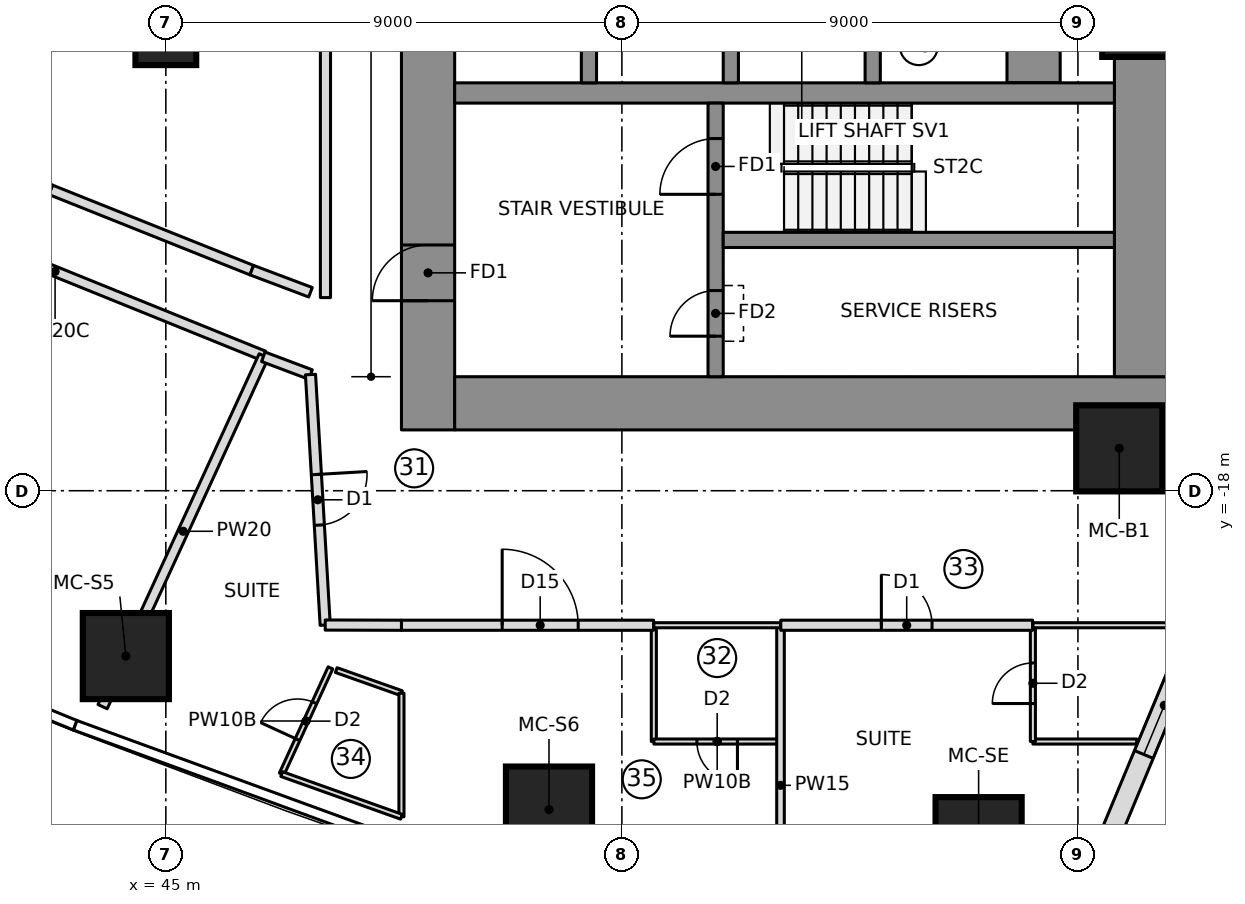
"""IFC4 building model, lengths in metres.
Left out: names, types, materials, properties, quantities, classifications, styles, units other than length and angle.
Written with IfcOpenShell. Run it as: python <this file> out.ifc"""

import sys

from ifc_helpers import new_model, si_unit, direction, frame, frame_2d, origin, origin_2d, place, context, subcontext, project, spatial, polyline, rectangle, outline, extrude, element, fill, save


model = new_model("IFC4")
c1 = context("Model", 3, precision=1e-05, world=origin(), true_north=direction((0.0, 1.0)))
c2 = subcontext(c1, "Body", "Model", "MODEL_VIEW")
j1 = project(units=[si_unit("LENGTHUNIT", "METRE"), si_unit("PLANEANGLEUNIT", "RADIAN")], contexts=[c1])
p1 = place(None, origin())
s1 = spatial("IfcSite", under=j1, at=p1, CompositionType="ELEMENT")
p2 = place(p1, origin())
s2 = spatial("IfcBuilding", under=s1, at=p2, CompositionType="ELEMENT")
p3 = place(p2, frame((0.0, 0.0, 95.55)))
s3 = spatial("IfcBuildingStorey", under=s2, at=p3, CompositionType="ELEMENT", Elevation=95.55)
p4 = place(p3, frame((50.175, -16.8, 0.0), z_axis=(0.0, 0.0, 1.0), x_axis=(0.0, 1.0, 0.0)))
e1 = element("IfcWall", 1, at=p4, inside=s3, PredefinedType="SHEAR", context=c2, shape_type="SweptSolid", body=[
    extrude(rectangle(XDim=10.15, YDim=1.05, at=frame_2d((5.075, 0.0))), origin(), (0.0, 0.0, 1.0), 3.55),
])
p5 = place(p4, frame((2.55, 0.0, 0.0)))
e2 = element("IfcOpeningElement", 2, at=p5, cuts=e1, PredefinedType="OPENING", context=c2, shape_type="SweptSolid", body=[
    extrude(rectangle(XDim=1.1, YDim=2.1, at=frame_2d((0.55, 1.05))), frame((0.0, 0.535, 0.0), z_axis=(0.0, -1.0, 0.0), x_axis=(1.0, 0.0, 0.0)), (0.0, 0.0, 1.0), 1.07),
])
p6 = place(p3, frame((50.7, -16.275, 0.0), z_axis=(0.0, 0.0, 1.0), x_axis=(1.0, 0.0, 0.0)))
e3 = element("IfcWall", 3, at=p6, inside=s3, PredefinedType="SHEAR", context=c2, shape_type="SweptSolid", body=[
    extrude(rectangle(XDim=14.07, YDim=1.05, at=frame_2d((7.035, 0.0))), origin(), (0.0, 0.0, 1.0), 3.55),
])
p7 = place(p3, frame((64.245, -15.75, 0.0), z_axis=(0.0, 0.0, 1.0), x_axis=(0.0, 1.0, 0.0)))
e4 = element("IfcWall", 4, at=p7, inside=s3, PredefinedType="SHEAR", context=c2, shape_type="SweptSolid", body=[
    extrude(rectangle(XDim=6.361, YDim=1.05, at=frame_2d((3.181, 0.0))), origin(), (0.0, 0.0, 1.0), 3.55),
])
p8 = place(p3, frame((62.125, -9.95, 0.0), z_axis=(0.0, 0.0, 1.0), x_axis=(0.0, 1.0, 0.0)))
e5 = element("IfcWall", 5, at=p8, inside=s3, PredefinedType="SHEAR", context=c2, shape_type="SweptSolid", body=[
    extrude(rectangle(XDim=19.9, YDim=1.05, at=frame_2d((9.95, 0.0))), origin(), (0.0, 0.0, 1.0), 3.55),
])
p9 = place(p3, frame((50.7, -10.15, 0.0), z_axis=(0.0, 0.0, 1.0), x_axis=(1.0, 0.0, 0.0)))
e6 = element("IfcWall", 6, at=p9, inside=s3, PredefinedType="SHEAR", context=c2, shape_type="SweptSolid", body=[
    extrude(rectangle(XDim=13.02, YDim=0.4, at=frame_2d((6.51, 0.0))), origin(), (0.0, 0.0, 1.0), 3.55),
])
for number, where, z_axis, x_axis in (
    (7, (53.35, -9.95, 0.0), (0.0, 0.0, 1.0), (0.0, 1.0, 0.0)),
    (8, (56.15, -9.95, 0.0), (0.0, 0.0, 1.0), (0.0, 1.0, 0.0)),
    (9, (58.95, -9.95, 0.0), (0.0, 0.0, 1.0), (0.0, 1.0, 0.0)),
):
    element("IfcWall", number, at=place(p3, frame(where, z_axis=z_axis, x_axis=x_axis)), inside=s3, PredefinedType="SHEAR", context=c2, shape_type="SweptSolid", body=[
        extrude(rectangle(XDim=3.0, YDim=0.3, at=frame_2d((1.5, 0.0))), origin(), (0.0, 0.0, 1.0), 3.55),
    ])
p10 = place(p3, frame((55.85, -15.75, 0.0), z_axis=(0.0, 0.0, 1.0), x_axis=(0.0, 1.0, 0.0)))
e10 = element("IfcWall", 10, at=p10, inside=s3, PredefinedType="SHEAR", context=c2, shape_type="SweptSolid", body=[
    extrude(rectangle(XDim=5.4, YDim=0.3, at=frame_2d((2.7, 0.0))), origin(), (0.0, 0.0, 1.0), 3.55),
])
p11 = place(p10, frame((3.6, 0.0, 0.0)))
e11 = element("IfcOpeningElement", 11, at=p11, cuts=e10, PredefinedType="OPENING", context=c2, shape_type="SweptSolid", body=[
    extrude(rectangle(XDim=1.1, YDim=2.1, at=frame_2d((0.55, 1.05))), frame((0.0, 0.16, 0.0), z_axis=(0.0, -1.0, 0.0), x_axis=(1.0, 0.0, 0.0)), (0.0, 0.0, 1.0), 0.32),
])
p12 = place(p10, frame((0.8, 0.0, 0.0)))
e12 = element("IfcOpeningElement", 12, at=p12, cuts=e10, PredefinedType="OPENING", context=c2, shape_type="SweptSolid", body=[
    extrude(rectangle(XDim=0.9, YDim=2.1, at=frame_2d((0.45, 1.05))), frame((0.0, 0.16, 0.0), z_axis=(0.0, -1.0, 0.0), x_axis=(1.0, 0.0, 0.0)), (0.0, 0.0, 1.0), 0.32),
])
p13 = place(p3, frame((56.0, -13.05, 0.0), z_axis=(0.0, 0.0, 1.0), x_axis=(1.0, 0.0, 0.0)))
e13 = element("IfcWall", 13, at=p13, inside=s3, PredefinedType="SHEAR", context=c2, shape_type="SweptSolid", body=[
    extrude(rectangle(XDim=7.72, YDim=0.3, at=frame_2d((3.86, 0.0))), origin(), (0.0, 0.0, 1.0), 3.55),
])
for number, where, z_axis, x_axis in (
    (14, (44.211, -21.264, 0.0), (0.0, 0.0, 1.0), (1.0, 0.0, 0.0)),
    (15, (52.562, -24.293, 0.0), (0.0, 0.0, 1.0), (1.0, 0.0, 0.0)),
    (16, (61.04, -24.897, 0.0), (0.0, 0.0, 1.0), (1.0, 0.0, 0.0)),
    (17, (63.816, -17.164, 0.0), (0.0, 0.0, 1.0), (1.0, 0.0, 0.0)),
    (18, (64.329, -8.589, 0.0), (0.0, 0.0, 1.0), (1.0, 0.0, 0.0)),
):
    element("IfcColumn", number, at=place(p3, frame(where, z_axis=z_axis, x_axis=x_axis)), inside=s3, PredefinedType="COLUMN", context=c2, shape_type="SweptSolid", body=[
        extrude(rectangle(XDim=1.7, YDim=1.7, at=origin_2d()), origin(), (0.0, 0.0, 1.0), 3.55),
    ])
p14 = place(p3, frame((45.0, -9.0, 0.0), z_axis=(0.0, 0.0, 1.0), x_axis=(1.0, 0.0, 0.0)))
e19 = element("IfcColumn", 19, at=p14, inside=s3, PredefinedType="COLUMN", context=c2, shape_type="SweptSolid", body=[
    extrude(rectangle(XDim=1.2, YDim=1.2, at=origin_2d()), origin(), (0.0, 0.0, 1.0), 3.55),
])
p15 = place(p3, frame((63.59, -24.916, 0.0), z_axis=(0.0, 0.0, 1.0), x_axis=(0.383997751971, 0.923334027577, 0.0)))
e20 = element("IfcWall", 20, at=p15, inside=s3, PredefinedType="NOTDEFINED", context=c2, shape_type="SweptSolid", body=[
    extrude(outline(polyline([(-0.061, -0.2), (4.27, -0.2), (4.208, 0.2), (0.061, 0.2), (-0.061, -0.2)])), origin(), (0.0, 0.0, 1.0), 3.25),
])
p16 = place(p15, frame((1.852, 0.0, 0.6)))
e21 = element("IfcOpeningElement", 21, at=p16, cuts=e20, PredefinedType="OPENING", context=c2, shape_type="SweptSolid", body=[
    extrude(outline(polyline([(0.0, 1.4), (0.08, 1.802), (0.308, 2.142), (0.648, 2.37), (1.05, 2.45), (1.452, 2.37), (1.792, 2.142), (2.02, 1.802), (2.1, 1.4), (2.1, 1.05), (2.02, 0.648), (1.792, 0.308), (1.452, 0.08), (1.05, 0.0), (0.648, 0.08), (0.308, 0.308), (0.08, 0.648), (0.0, 1.05), (0.0, 1.4)])), frame((0.0, 0.21, 0.0), z_axis=(0.0, -1.0, 0.0), x_axis=(1.0, 0.0, 0.0)), (0.0, 0.0, 1.0), 0.42),
])
p17 = place(p3, frame((54.631, -22.95, 0.0), z_axis=(0.0, 0.0, 1.0), x_axis=(0.0, 1.0, 0.0)))
e22 = element("IfcWall", 22, at=p17, inside=s3, PredefinedType="PARTITIONING", context=c2, shape_type="SweptSolid", body=[
    extrude(rectangle(XDim=2.3, YDim=0.1, at=frame_2d((1.15, 0.0))), origin(), (0.0, 0.0, 1.0), 3.25),
])
p18 = place(p3, frame((57.131, -22.95, 0.0), z_axis=(0.0, 0.0, 1.0), x_axis=(-1.0, 0.0, 0.0)))
e23 = element("IfcWall", 23, at=p18, inside=s3, PredefinedType="PARTITIONING", context=c2, shape_type="SweptSolid", body=[
    extrude(rectangle(XDim=2.5, YDim=0.1, at=frame_2d((1.25, 0.0))), origin(), (0.0, 0.0, 1.0), 3.25),
])
p19 = place(p18, frame((0.85, 0.0, 0.0)))
e24 = element("IfcOpeningElement", 24, at=p19, cuts=e23, PredefinedType="OPENING", context=c2, shape_type="SweptSolid", body=[
    extrude(rectangle(XDim=0.8, YDim=2.1, at=frame_2d((0.4, 1.05))), frame((0.0, 0.06, 0.0), z_axis=(0.0, -1.0, 0.0), x_axis=(1.0, 0.0, 0.0)), (0.0, 0.0, 1.0), 0.12),
])
p20 = place(p3, frame((64.16, -22.95, 0.0), z_axis=(0.0, 0.0, 1.0), x_axis=(-1.0, 0.0, 0.0)))
e25 = element("IfcWall", 25, at=p20, inside=s3, PredefinedType="PARTITIONING", context=c2, shape_type="SweptSolid", body=[
    extrude(rectangle(XDim=2.049, YDim=0.1, at=frame_2d((1.025, 0.0))), origin(), (0.0, 0.0, 1.0), 3.25),
])
p21 = place(p3, frame((62.111, -22.95, 0.0), z_axis=(0.0, 0.0, 1.0), x_axis=(0.0, 1.0, 0.0)))
e26 = element("IfcWall", 26, at=p21, inside=s3, PredefinedType="PARTITIONING", context=c2, shape_type="SweptSolid", body=[
    extrude(rectangle(XDim=2.3, YDim=0.1, at=frame_2d((1.15, 0.0))), origin(), (0.0, 0.0, 1.0), 3.25),
])
p22 = place(p21, frame((0.75, 0.0, 0.0)))
e27 = element("IfcOpeningElement", 27, at=p22, cuts=e26, PredefinedType="OPENING", context=c2, shape_type="SweptSolid", body=[
    extrude(rectangle(XDim=0.8, YDim=2.1, at=frame_2d((0.4, 1.05))), frame((0.0, 0.06, 0.0), z_axis=(0.0, -1.0, 0.0), x_axis=(1.0, 0.0, 0.0)), (0.0, 0.0, 1.0), 0.12),
])
p23 = place(p3, frame((57.131, -26.979, 0.0), z_axis=(0.0, 0.0, 1.0), x_axis=(0.0, 1.0, 0.0)))
e28 = element("IfcWall", 28, at=p23, inside=s3, PredefinedType="PARTITIONING", context=c2, shape_type="SweptSolid", body=[
    extrude(rectangle(XDim=6.329, YDim=0.15, at=frame_2d((3.165, 0.0))), origin(), (0.0, 0.0, 1.0), 3.25),
])
p24 = place(p3, frame((38.696, -12.007, 0.0), z_axis=(0.0, 0.0, 1.0), x_axis=(0.927027566285, -0.374993188401, 0.0)))
e29 = element("IfcWall", 29, at=p24, inside=s3, PredefinedType="PARTITIONING", context=c2, shape_type="SweptSolid", body=[
    extrude(rectangle(XDim=8.885, YDim=0.2, at=frame_2d((4.442, 0.0))), origin(), (0.0, 0.0, 1.0), 3.25),
])
p25 = place(p24, frame((3.05, 0.0, 0.0)))
e30 = element("IfcOpeningElement", 30, at=p25, cuts=e29, PredefinedType="OPENING", context=c2, shape_type="SweptSolid", body=[
    extrude(rectangle(XDim=1.0, YDim=2.1, at=frame_2d((0.5, 1.05))), frame((0.0, 0.11, 0.0), z_axis=(0.0, -1.0, 0.0), x_axis=(1.0, 0.0, 0.0)), (0.0, 0.0, 1.0), 0.22),
])
p26 = place(p3, frame((43.752, -22.262, 0.0), z_axis=(0.0, 0.0, 1.0), x_axis=(0.417437957167, 0.908705426371, 0.0)))
e31 = element("IfcWall", 31, at=p26, inside=s3, PredefinedType="PARTITIONING", context=c2, shape_type="SweptSolid", body=[
    extrude(rectangle(XDim=7.619, YDim=0.2, at=frame_2d((3.81, 0.0))), origin(), (0.0, 0.0, 1.0), 3.25),
])
p27 = place(p3, frame((48.363, -21.54, 0.0), z_axis=(0.0, 0.0, 1.0), x_axis=(0.942692856107, -0.333661773425, 0.0)))
e32 = element("IfcWall", 32, at=p27, inside=s3, PredefinedType="PARTITIONING", context=c2, shape_type="SweptSolid", body=[
    extrude(rectangle(XDim=1.365, YDim=0.1, at=frame_2d((0.683, 0.0))), origin(), (0.0, 0.0, 1.0), 3.25),
])
p28 = place(p3, frame((47.286, -23.592, 0.0), z_axis=(0.0, 0.0, 1.0), x_axis=(0.41749308293, 0.908680100864, 0.0)))
e33 = element("IfcWall", 33, at=p28, inside=s3, PredefinedType="PARTITIONING", context=c2, shape_type="SweptSolid", body=[
    extrude(rectangle(XDim=2.306, YDim=0.1, at=frame_2d((1.153, 0.0))), origin(), (0.0, 0.0, 1.0), 3.25),
])
p29 = place(p28, frame((0.75, 0.0, 0.0)))
e34 = element("IfcOpeningElement", 34, at=p29, cuts=e33, PredefinedType="OPENING", context=c2, shape_type="SweptSolid", body=[
    extrude(rectangle(XDim=0.8, YDim=2.1, at=frame_2d((0.4, 1.05))), frame((0.0, 0.06, 0.0), z_axis=(0.0, -1.0, 0.0), x_axis=(1.0, 0.0, 0.0)), (0.0, 0.0, 1.0), 0.12),
])
p30 = place(p3, frame((46.696, -13.647, 0.0), z_axis=(0.0, 0.0, 1.0), x_axis=(-0.928638161177, 0.370986745864, 0.0)))
e35 = element("IfcWall", 35, at=p30, inside=s3, PredefinedType="PARTITIONING", context=c2, shape_type="SweptSolid", body=[
    extrude(rectangle(XDim=4.273, YDim=0.2, at=frame_2d((2.136, 0.0))), origin(), (0.0, 0.0, 1.0), 3.25),
])
p31 = place(p3, frame((42.728, -12.062, 0.0), z_axis=(0.0, 0.0, 1.0), x_axis=(-0.921037415532, 0.389474105929, 0.0)))
e36 = element("IfcWall", 36, at=p31, inside=s3, PredefinedType="PARTITIONING", context=c2, shape_type="SweptSolid", body=[
    extrude(rectangle(XDim=4.273, YDim=0.2, at=frame_2d((2.137, 0.0))), origin(), (0.0, 0.0, 1.0), 3.25),
])
p32 = place(p3, frame((49.65, -20.655, 0.0), z_axis=(0.0, 0.0, 1.0), x_axis=(1.0, 0.0, 0.0)))
e37 = element("IfcWall", 37, at=p32, inside=s3, PredefinedType="PARTITIONING", context=c2, shape_type="SweptSolid", body=[
    extrude(rectangle(XDim=4.976, YDim=0.2, at=frame_2d((2.488, 0.0))), origin(), (0.0, 0.0, 1.0), 3.25),
])
p33 = place(p32, frame((1.988, 0.0, 0.0)))
e38 = element("IfcOpeningElement", 38, at=p33, cuts=e37, PredefinedType="OPENING", context=c2, shape_type="SweptSolid", body=[
    extrude(rectangle(XDim=1.5, YDim=2.1, at=frame_2d((0.75, 1.05))), frame((0.0, 0.11, 0.0), z_axis=(0.0, -1.0, 0.0), x_axis=(1.0, 0.0, 0.0)), (0.0, 0.0, 1.0), 0.22),
])
p34 = place(p3, frame((57.135, -20.655, 0.0), z_axis=(0.0, 0.0, 1.0), x_axis=(1.0, 0.0, 0.0)))
e39 = element("IfcWall", 39, at=p34, inside=s3, PredefinedType="PARTITIONING", context=c2, shape_type="SweptSolid", body=[
    extrude(rectangle(XDim=4.971, YDim=0.2, at=frame_2d((2.485, 0.0))), origin(), (0.0, 0.0, 1.0), 3.25),
])
p35 = place(p34, frame((1.985, 0.0, 0.0)))
e40 = element("IfcOpeningElement", 40, at=p35, cuts=e39, PredefinedType="OPENING", context=c2, shape_type="SweptSolid", body=[
    extrude(rectangle(XDim=1.0, YDim=2.1, at=frame_2d((0.5, 1.05))), frame((0.0, 0.11, 0.0), z_axis=(0.0, -1.0, 0.0), x_axis=(1.0, 0.0, 0.0)), (0.0, 0.0, 1.0), 0.22),
])
p36 = place(p3, frame((54.631, -20.655, 0.0), z_axis=(0.0, 0.0, 1.0), x_axis=(1.0, 0.0, 0.0)))
e41 = element("IfcWall", 41, at=p36, inside=s3, PredefinedType="PARTITIONING", context=c2, shape_type="SweptSolid", body=[
    extrude(rectangle(XDim=2.5, YDim=0.1, at=frame_2d((1.25, 0.0))), origin(), (0.0, 0.0, 1.0), 3.25),
])
p37 = place(p3, frame((62.111, -20.655, 0.0), z_axis=(0.0, 0.0, 1.0), x_axis=(1.0, 0.0, 0.0)))
e42 = element("IfcWall", 42, at=p37, inside=s3, PredefinedType="PARTITIONING", context=c2, shape_type="SweptSolid", body=[
    extrude(rectangle(XDim=2.906, YDim=0.1, at=frame_2d((1.453, 0.0))), origin(), (0.0, 0.0, 1.0), 3.25),
])
p38 = place(p3, frame((49.65, -21.996, 0.0), z_axis=(0.0, 0.0, 1.0), x_axis=(0.0, -1.0, 0.0)))
e43 = element("IfcWall", 43, at=p38, inside=s3, PredefinedType="PARTITIONING", context=c2, shape_type="SweptSolid", body=[
    extrude(rectangle(XDim=2.439, YDim=0.1, at=frame_2d((1.22, 0.0))), origin(), (0.0, 0.0, 1.0), 3.25),
])
p39 = place(p3, frame((49.65, -24.435, 0.0), z_axis=(0.0, 0.0, 1.0), x_axis=(-0.941933231826, 0.335800218555, 0.0)))
e44 = element("IfcWall", 44, at=p39, inside=s3, PredefinedType="PARTITIONING", context=c2, shape_type="SweptSolid", body=[
    extrude(rectangle(XDim=2.51, YDim=0.1, at=frame_2d((1.255, 0.0))), origin(), (0.0, 0.0, 1.0), 3.25),
])
p40 = place(p3, frame((46.924, -15.357, 0.0), z_axis=(0.0, 0.0, 1.0), x_axis=(0.935803526171, -0.35252199989, 0.0)))
e45 = element("IfcWall", 45, at=p40, inside=s3, PredefinedType="PARTITIONING", context=c2, shape_type="SweptSolid", body=[
    extrude(rectangle(XDim=0.995, YDim=0.2, at=frame_2d((0.497, 0.0))), origin(), (0.0, 0.0, 1.0), 3.25),
])
p41 = place(p3, frame((47.855, -14.083, 0.0), z_axis=(0.0, 0.0, 1.0), x_axis=(-0.935907269358, 0.352246480696, 0.0)))
e46 = element("IfcWall", 46, at=p41, inside=s3, PredefinedType="PARTITIONING", context=c2, shape_type="SweptSolid", body=[
    extrude(rectangle(XDim=1.239, YDim=0.2, at=frame_2d((0.619, 0.0))), origin(), (0.0, 0.0, 1.0), 3.25),
])
p42 = place(p3, frame((47.855, -15.707, 0.0), z_axis=(0.0, 0.0, 1.0), x_axis=(0.058568850083, -0.998283371493, 0.0)))
e47 = element("IfcWall", 47, at=p42, inside=s3, PredefinedType="PARTITIONING", context=c2, shape_type="SweptSolid", body=[
    extrude(rectangle(XDim=4.952, YDim=0.2, at=frame_2d((2.476, 0.0))), origin(), (0.0, 0.0, 1.0), 3.25),
])
p43 = place(p42, frame((1.976, 0.0, 0.0)))
e48 = element("IfcOpeningElement", 48, at=p43, cuts=e47, PredefinedType="OPENING", context=c2, shape_type="SweptSolid", body=[
    extrude(rectangle(XDim=1.0, YDim=2.1, at=frame_2d((0.5, 1.05))), frame((0.0, 0.11, 0.0), z_axis=(0.0, -1.0, 0.0), x_axis=(1.0, 0.0, 0.0)), (0.0, 0.0, 1.0), 0.22),
])
p44 = place(p3, frame((48.15, 14.189, 0.0), z_axis=(0.0, 0.0, 1.0), x_axis=(0.0, -1.0, 0.0)))
e49 = element("IfcWall", 49, at=p44, inside=s3, PredefinedType="PARTITIONING", context=c2, shape_type="SweptSolid", body=[
    extrude(rectangle(XDim=28.377, YDim=0.2, at=frame_2d((14.189, 0.0))), origin(), (0.0, 0.0, 1.0), 3.25),
])
p45 = place(p3, frame((48.145, -20.651, 0.0), z_axis=(0.0, 0.0, 1.0), x_axis=(0.999996196879, -0.002757938895, 0.0)))
e50 = element("IfcWall", 50, at=p45, inside=s3, PredefinedType="PARTITIONING", context=c2, shape_type="SweptSolid", body=[
    extrude(rectangle(XDim=1.505, YDim=0.2, at=frame_2d((0.752, 0.0))), origin(), (0.0, 0.0, 1.0), 3.25),
])
p46 = place(p16, origin())
e51 = element("IfcWindow", 51, at=p46, inside=s3, PartitioningType="SINGLE_PANEL", PredefinedType="WINDOW", context=c2, shape_type="SweptSolid", body=[
    extrude(outline(polyline([(0.0, 1.4), (0.08, 1.802), (0.308, 2.142), (0.648, 2.37), (1.05, 2.45), (1.452, 2.37), (1.792, 2.142), (2.02, 1.802), (2.1, 1.4), (2.1, 1.05), (2.02, 0.648), (1.792, 0.308), (1.452, 0.08), (1.05, 0.0), (0.648, 0.08), (0.308, 0.308), (0.08, 0.648), (0.0, 1.05), (0.0, 1.4)])), frame((0.0, 0.17, 0.0), z_axis=(0.0, -1.0, 0.0), x_axis=(1.0, 0.0, 0.0)), (0.0, 0.0, 1.0), 0.06),
])
fill(e21, e51)
p47 = place(p19, origin())
e52 = element("IfcDoor", 52, at=p47, inside=s3, OperationType="SINGLE_SWING_LEFT", PredefinedType="DOOR", context=c2, shape_type="SweptSolid", body=[
    extrude(rectangle(XDim=0.8, YDim=2.1, at=frame_2d((0.4, 1.05))), frame((0.0, 0.025, 0.0), z_axis=(0.0, -1.0, 0.0), x_axis=(1.0, 0.0, 0.0)), (0.0, 0.0, 1.0), 0.05),
])
fill(e24, e52)
p48 = place(p22, origin())
e53 = element("IfcDoor", 53, at=p48, inside=s3, OperationType="SINGLE_SWING_LEFT", PredefinedType="DOOR", context=c2, shape_type="SweptSolid", body=[
    extrude(rectangle(XDim=0.8, YDim=2.1, at=frame_2d((0.4, 1.05))), frame((0.0, 0.025, 0.0), z_axis=(0.0, -1.0, 0.0), x_axis=(1.0, 0.0, 0.0)), (0.0, 0.0, 1.0), 0.05),
])
fill(e27, e53)
p49 = place(p29, origin())
e54 = element("IfcDoor", 54, at=p49, inside=s3, OperationType="SINGLE_SWING_LEFT", PredefinedType="DOOR", context=c2, shape_type="SweptSolid", body=[
    extrude(rectangle(XDim=0.8, YDim=2.1, at=frame_2d((0.4, 1.05))), frame((0.0, 0.025, 0.0), z_axis=(0.0, -1.0, 0.0), x_axis=(1.0, 0.0, 0.0)), (0.0, 0.0, 1.0), 0.05),
])
fill(e34, e54)
p50 = place(p33, origin())
e55 = element("IfcDoor", 55, at=p50, inside=s3, OperationType="DOUBLE_DOOR_SINGLE_SWING", PredefinedType="DOOR", context=c2, shape_type="SweptSolid", body=[
    extrude(rectangle(XDim=1.5, YDim=2.1, at=frame_2d((0.75, 1.05))), frame((0.0, 0.025, 0.0), z_axis=(0.0, -1.0, 0.0), x_axis=(1.0, 0.0, 0.0)), (0.0, 0.0, 1.0), 0.05),
])
fill(e38, e55)
p51 = place(p35, origin())
e56 = element("IfcDoor", 56, at=p51, inside=s3, OperationType="SINGLE_SWING_LEFT", PredefinedType="DOOR", context=c2, shape_type="SweptSolid", body=[
    extrude(rectangle(XDim=1.0, YDim=2.1, at=frame_2d((0.5, 1.05))), frame((0.0, 0.025, 0.0), z_axis=(0.0, -1.0, 0.0), x_axis=(1.0, 0.0, 0.0)), (0.0, 0.0, 1.0), 0.05),
])
fill(e40, e56)
p52 = place(p43, origin())
e57 = element("IfcDoor", 57, at=p52, inside=s3, OperationType="SINGLE_SWING_LEFT", PredefinedType="DOOR", context=c2, shape_type="SweptSolid", body=[
    extrude(rectangle(XDim=1.0, YDim=2.1, at=frame_2d((0.5, 1.05))), frame((0.0, 0.025, 0.0), z_axis=(0.0, -1.0, 0.0), x_axis=(1.0, 0.0, 0.0)), (0.0, 0.0, 1.0), 0.05),
])
fill(e48, e57)
p53 = place(p11, origin())
e58 = element("IfcDoor", 58, at=p53, inside=s3, OperationType="SINGLE_SWING_RIGHT", PredefinedType="DOOR", context=c2, shape_type="SweptSolid", body=[
    extrude(rectangle(XDim=1.1, YDim=2.1, at=frame_2d((0.55, 1.05))), frame((0.0, 0.025, 0.0), z_axis=(0.0, -1.0, 0.0), x_axis=(1.0, 0.0, 0.0)), (0.0, 0.0, 1.0), 0.05),
])
fill(e11, e58)
p54 = place(p5, origin())
e59 = element("IfcDoor", 59, at=p54, inside=s3, OperationType="SINGLE_SWING_RIGHT", PredefinedType="DOOR", context=c2, shape_type="SweptSolid", body=[
    extrude(rectangle(XDim=1.1, YDim=2.1, at=frame_2d((0.55, 1.05))), frame((0.0, 0.025, 0.0), z_axis=(0.0, -1.0, 0.0), x_axis=(1.0, 0.0, 0.0)), (0.0, 0.0, 1.0), 0.05),
])
fill(e2, e59)
p55 = place(p12, origin())
e60 = element("IfcDoor", 60, at=p55, inside=s3, OperationType="SINGLE_SWING_LEFT", PredefinedType="DOOR", context=c2, shape_type="SweptSolid", body=[
    extrude(rectangle(XDim=0.9, YDim=2.1, at=frame_2d((0.45, 1.05))), frame((0.0, 0.025, 0.0), z_axis=(0.0, -1.0, 0.0), x_axis=(1.0, 0.0, 0.0)), (0.0, 0.0, 1.0), 0.05),
])
fill(e12, e60)
save(model, sys.argv[1])
